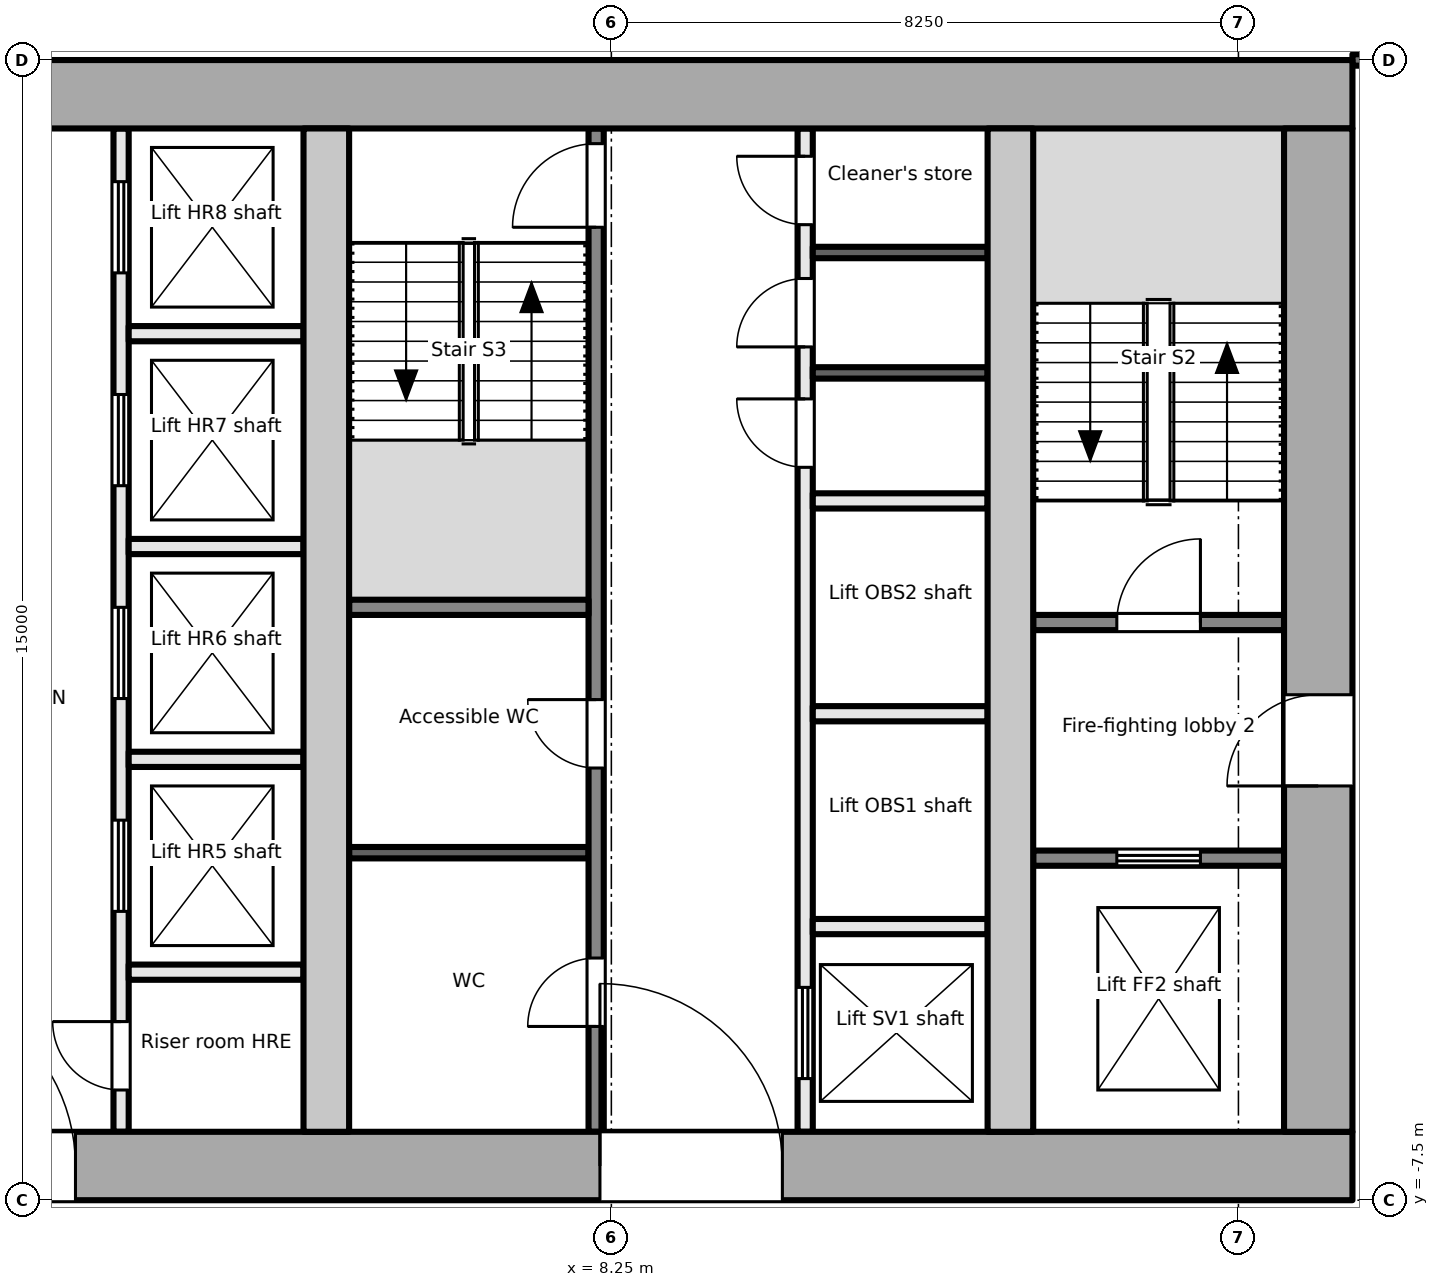
"""IFC4 building model, lengths in metres.
Left out: names, types, materials, properties, quantities, classifications, styles, units other than length and angle.
Written with IfcOpenShell. Run it as: python <this file> out.ifc"""

import sys

from ifc_helpers import new_model, si_unit, direction, frame, frame_2d, origin, place, context, subcontext, project, spatial, rectangle, extrude, element, fill, save


model = new_model("IFC4")
c1 = context("Model", 3, precision=1e-05, world=origin(), true_north=direction((0.0, 1.0)))
c2 = subcontext(c1, "Body", "Model", "MODEL_VIEW")
j1 = project(units=[si_unit("LENGTHUNIT", "METRE"), si_unit("PLANEANGLEUNIT", "RADIAN")], contexts=[c1])
p1 = place(None, origin())
s1 = spatial("IfcSite", under=j1, at=p1, CompositionType="ELEMENT")
p2 = place(p1, origin())
s2 = spatial("IfcBuilding", under=s1, at=p2, CompositionType="ELEMENT")
p3 = place(p2, frame((0.0, 0.0, 180.2)))
s3 = spatial("IfcBuildingStorey", under=s2, at=p3, CompositionType="ELEMENT", Elevation=180.2)
p4 = place(p3, frame((-18.0, -7.05, -0.2), z_axis=(0.0, 0.0, 1.0), x_axis=(1.0, 0.0, 0.0)))
e1 = element("IfcWall", 1, at=p4, inside=s3, PredefinedType="SHEAR", context=c2, shape_type="SweptSolid", body=[
    extrude(rectangle(XDim=36.0, YDim=0.9, at=frame_2d((18.0, 0.0))), origin(), (0.0, 0.0, 1.0), 3.9),
])
p5 = place(p4, frame((11.3, 0.0, 0.2)))
e2 = element("IfcOpeningElement", 2, at=p5, cuts=e1, PredefinedType="OPENING", context=c2, shape_type="SweptSolid", body=[
    extrude(rectangle(XDim=1.8, YDim=2.1, at=frame_2d((0.9, 1.05))), frame((0.0, 0.46, 0.0), z_axis=(0.0, -1.0, 0.0), x_axis=(1.0, 0.0, 0.0)), (0.0, 0.0, 1.0), 0.921),
])
p6 = place(p4, frame((16.8, 0.0, 0.2)))
e3 = element("IfcOpeningElement", 3, at=p6, cuts=e1, PredefinedType="OPENING", context=c2, shape_type="SweptSolid", body=[
    extrude(rectangle(XDim=2.4, YDim=2.1, at=frame_2d((1.2, 1.05))), frame((0.0, 0.46, 0.0), z_axis=(0.0, -1.0, 0.0), x_axis=(1.0, 0.0, 0.0)), (0.0, 0.0, 1.0), 0.921),
])
p7 = place(p4, frame((26.1, 0.0, 0.2)))
e4 = element("IfcOpeningElement", 4, at=p7, cuts=e1, PredefinedType="OPENING", context=c2, shape_type="SweptSolid", body=[
    extrude(rectangle(XDim=2.4, YDim=2.1, at=frame_2d((1.2, 1.05))), frame((0.0, 0.46, 0.0), z_axis=(0.0, -1.0, 0.0), x_axis=(1.0, 0.0, 0.0)), (0.0, 0.0, 1.0), 0.921),
])
p8 = place(p3, frame((-18.0, 7.05, -0.2), z_axis=(0.0, 0.0, 1.0), x_axis=(1.0, 0.0, 0.0)))
e5 = element("IfcWall", 5, at=p8, inside=s3, PredefinedType="SHEAR", context=c2, shape_type="SweptSolid", body=[
    extrude(rectangle(XDim=36.0, YDim=0.9, at=frame_2d((18.0, 0.0))), origin(), (0.0, 0.0, 1.0), 3.9),
])
p9 = place(p3, frame((17.55, -6.6, -0.2), z_axis=(0.0, 0.0, 1.0), x_axis=(0.0, 1.0, 0.0)))
e6 = element("IfcWall", 6, at=p9, inside=s3, PredefinedType="SHEAR", context=c2, shape_type="SweptSolid", body=[
    extrude(rectangle(XDim=13.2, YDim=0.9, at=frame_2d((6.6, 0.0))), origin(), (0.0, 0.0, 1.0), 3.9),
])
p10 = place(p9, frame((4.55, 0.0, 0.2)))
e7 = element("IfcOpeningElement", 7, at=p10, cuts=e6, PredefinedType="OPENING", context=c2, shape_type="SweptSolid", body=[
    extrude(rectangle(XDim=1.2, YDim=2.1, at=frame_2d((0.6, 1.05))), frame((0.0, 0.46, 0.0), z_axis=(0.0, -1.0, 0.0), x_axis=(1.0, 0.0, 0.0)), (0.0, 0.0, 1.0), 0.921),
])
for number, where, z_axis, x_axis in (
    (8, (4.5, -6.6, -0.2), (0.0, 0.0, 1.0), (0.0, 1.0, 0.0)),
    (9, (13.5, -6.6, -0.2), (0.0, 0.0, 1.0), (0.0, 1.0, 0.0)),
):
    element("IfcWall", number, at=place(p3, frame(where, z_axis=z_axis, x_axis=x_axis)), inside=s3, PredefinedType="SHEAR", context=c2, shape_type="SweptSolid", body=[
        extrude(rectangle(XDim=13.2, YDim=0.6, at=frame_2d((6.6, 0.0))), origin(), (0.0, 0.0, 1.0), 3.9),
    ])
p11 = place(p3, frame((13.8, -3.0, 0.0), z_axis=(0.0, 0.0, 1.0), x_axis=(1.0, 0.0, 0.0)))
e10 = element("IfcWall", 10, at=p11, inside=s3, PredefinedType="PARTITIONING", context=c2, shape_type="SweptSolid", body=[
    extrude(rectangle(XDim=3.3, YDim=0.2, at=frame_2d((1.65, 0.0))), origin(), (0.0, 0.0, 1.0), 3.7),
])
p12 = place(p11, frame((1.1, 0.0, 0.0)))
e11 = element("IfcOpeningElement", 11, at=p12, cuts=e10, PredefinedType="OPENING", context=c2, shape_type="SweptSolid", body=[
    extrude(rectangle(XDim=1.1, YDim=2.1, at=frame_2d((0.55, 1.05))), frame((0.0, 0.111, 0.0), z_axis=(0.0, -1.0, 0.0), x_axis=(1.0, 0.0, 0.0)), (0.0, 0.0, 1.0), 0.221),
])
p13 = place(p3, frame((13.8, 0.1, 0.0), z_axis=(0.0, 0.0, 1.0), x_axis=(1.0, 0.0, 0.0)))
e12 = element("IfcWall", 12, at=p13, inside=s3, PredefinedType="PARTITIONING", context=c2, shape_type="SweptSolid", body=[
    extrude(rectangle(XDim=3.3, YDim=0.2, at=frame_2d((1.65, 0.0))), origin(), (0.0, 0.0, 1.0), 3.7),
])
p14 = place(p13, frame((1.1, 0.0, 0.0)))
e13 = element("IfcOpeningElement", 13, at=p14, cuts=e12, PredefinedType="OPENING", context=c2, shape_type="SweptSolid", body=[
    extrude(rectangle(XDim=1.1, YDim=2.1, at=frame_2d((0.55, 1.05))), frame((0.0, 0.111, 0.0), z_axis=(0.0, -1.0, 0.0), x_axis=(1.0, 0.0, 0.0)), (0.0, 0.0, 1.0), 0.221),
])
p15 = place(p3, frame((1.8, -6.6, 0.0), z_axis=(0.0, 0.0, 1.0), x_axis=(0.0, 1.0, 0.0)))
e14 = element("IfcWall", 14, at=p15, inside=s3, PredefinedType="PARTITIONING", context=c2, shape_type="SweptSolid", body=[
    extrude(rectangle(XDim=13.2, YDim=0.2, at=frame_2d((6.6, 0.0))), origin(), (0.0, 0.0, 1.0), 3.7),
])
p16 = place(p15, frame((0.55, 0.0, 0.0)))
e15 = element("IfcOpeningElement", 15, at=p16, cuts=e14, PredefinedType="OPENING", context=c2, shape_type="SweptSolid", body=[
    extrude(rectangle(XDim=0.9, YDim=2.1, at=frame_2d((0.45, 1.05))), frame((0.0, 0.111, 0.0), z_axis=(0.0, -1.0, 0.0), x_axis=(1.0, 0.0, 0.0)), (0.0, 0.0, 1.0), 0.221),
])
p17 = place(p15, frame((2.9, 0.0, 0.0)))
e16 = element("IfcOpeningElement", 16, at=p17, cuts=e14, PredefinedType="OPENING", context=c2, shape_type="SweptSolid", body=[
    extrude(rectangle(XDim=1.2, YDim=2.1, at=frame_2d((0.6, 1.05))), frame((0.0, 0.111, 0.0), z_axis=(0.0, -1.0, 0.0), x_axis=(1.0, 0.0, 0.0)), (0.0, 0.0, 1.0), 0.221),
])
p18 = place(p15, frame((5.7, 0.0, 0.0)))
e17 = element("IfcOpeningElement", 17, at=p18, cuts=e14, PredefinedType="OPENING", context=c2, shape_type="SweptSolid", body=[
    extrude(rectangle(XDim=1.2, YDim=2.1, at=frame_2d((0.6, 1.05))), frame((0.0, 0.111, 0.0), z_axis=(0.0, -1.0, 0.0), x_axis=(1.0, 0.0, 0.0)), (0.0, 0.0, 1.0), 0.221),
])
p19 = place(p15, frame((8.5, 0.0, 0.0)))
e18 = element("IfcOpeningElement", 18, at=p19, cuts=e14, PredefinedType="OPENING", context=c2, shape_type="SweptSolid", body=[
    extrude(rectangle(XDim=1.2, YDim=2.1, at=frame_2d((0.6, 1.05))), frame((0.0, 0.111, 0.0), z_axis=(0.0, -1.0, 0.0), x_axis=(1.0, 0.0, 0.0)), (0.0, 0.0, 1.0), 0.221),
])
p20 = place(p15, frame((11.3, 0.0, 0.0)))
e19 = element("IfcOpeningElement", 19, at=p20, cuts=e14, PredefinedType="OPENING", context=c2, shape_type="SweptSolid", body=[
    extrude(rectangle(XDim=1.2, YDim=2.1, at=frame_2d((0.6, 1.05))), frame((0.0, 0.111, 0.0), z_axis=(0.0, -1.0, 0.0), x_axis=(1.0, 0.0, 0.0)), (0.0, 0.0, 1.0), 0.221),
])
for number, where, z_axis, x_axis in (
    (20, (1.9, -1.7, 0.0), (0.0, 0.0, 1.0), (1.0, 0.0, 0.0)),
    (21, (1.9, 1.1, 0.0), (0.0, 0.0, 1.0), (1.0, 0.0, 0.0)),
    (22, (1.9, 3.9, 0.0), (0.0, 0.0, 1.0), (1.0, 0.0, 0.0)),
    (23, (1.9, -4.5, 0.0), (0.0, 0.0, 1.0), (1.0, 0.0, 0.0)),
):
    element("IfcWall", number, at=place(p3, frame(where, z_axis=z_axis, x_axis=x_axis)), inside=s3, PredefinedType="PARTITIONING", context=c2, shape_type="SweptSolid", body=[
        extrude(rectangle(XDim=2.3, YDim=0.2, at=frame_2d((1.15, 0.0))), origin(), (0.0, 0.0, 1.0), 3.7),
    ])
p21 = place(p3, frame((8.05, -6.6, 0.0), z_axis=(0.0, 0.0, 1.0), x_axis=(0.0, 1.0, 0.0)))
e24 = element("IfcWall", 24, at=p21, inside=s3, PredefinedType="PARTITIONING", context=c2, shape_type="SweptSolid", body=[
    extrude(rectangle(XDim=13.2, YDim=0.2, at=frame_2d((6.6, 0.0))), origin(), (0.0, 0.0, 1.0), 3.7),
])
p22 = place(p21, frame((1.386, 0.0, 0.0)))
e25 = element("IfcOpeningElement", 25, at=p22, cuts=e24, PredefinedType="OPENING", context=c2, shape_type="SweptSolid", body=[
    extrude(rectangle(XDim=0.9, YDim=2.1, at=frame_2d((0.45, 1.05))), frame((0.0, 0.111, 0.0), z_axis=(0.0, -1.0, 0.0), x_axis=(1.0, 0.0, 0.0)), (0.0, 0.0, 1.0), 0.221),
])
p23 = place(p21, frame((4.786, 0.0, 0.0)))
e26 = element("IfcOpeningElement", 26, at=p23, cuts=e24, PredefinedType="OPENING", context=c2, shape_type="SweptSolid", body=[
    extrude(rectangle(XDim=0.9, YDim=2.1, at=frame_2d((0.45, 1.05))), frame((0.0, 0.111, 0.0), z_axis=(0.0, -1.0, 0.0), x_axis=(1.0, 0.0, 0.0)), (0.0, 0.0, 1.0), 0.221),
])
p24 = place(p21, frame((11.9, 0.0, 0.0)))
e27 = element("IfcOpeningElement", 27, at=p24, cuts=e24, PredefinedType="OPENING", context=c2, shape_type="SweptSolid", body=[
    extrude(rectangle(XDim=1.1, YDim=2.1, at=frame_2d((0.55, 1.05))), frame((0.0, 0.111, 0.0), z_axis=(0.0, -1.0, 0.0), x_axis=(1.0, 0.0, 0.0)), (0.0, 0.0, 1.0), 0.221),
])
p25 = place(p3, frame((10.8, -6.6, 0.0), z_axis=(0.0, 0.0, 1.0), x_axis=(0.0, 1.0, 0.0)))
e28 = element("IfcWall", 28, at=p25, inside=s3, PredefinedType="PARTITIONING", context=c2, shape_type="SweptSolid", body=[
    extrude(rectangle(XDim=13.2, YDim=0.2, at=frame_2d((6.6, 0.0))), origin(), (0.0, 0.0, 1.0), 3.7),
])
p26 = place(p25, frame((0.7, 0.0, 0.0)))
e29 = element("IfcOpeningElement", 29, at=p26, cuts=e28, PredefinedType="OPENING", context=c2, shape_type="SweptSolid", body=[
    extrude(rectangle(XDim=1.2, YDim=2.1, at=frame_2d((0.6, 1.05))), frame((0.0, 0.111, 0.0), z_axis=(0.0, -1.0, 0.0), x_axis=(1.0, 0.0, 0.0)), (0.0, 0.0, 1.0), 0.221),
])
p27 = place(p25, frame((8.742, 0.0, 0.0)))
e30 = element("IfcOpeningElement", 30, at=p27, cuts=e28, PredefinedType="OPENING", context=c2, shape_type="SweptSolid", body=[
    extrude(rectangle(XDim=0.9, YDim=2.1, at=frame_2d((0.45, 1.05))), frame((0.0, 0.111, 0.0), z_axis=(0.0, -1.0, 0.0), x_axis=(1.0, 0.0, 0.0)), (0.0, 0.0, 1.0), 0.221),
])
p28 = place(p25, frame((10.326, 0.0, 0.0)))
e31 = element("IfcOpeningElement", 31, at=p28, cuts=e28, PredefinedType="OPENING", context=c2, shape_type="SweptSolid", body=[
    extrude(rectangle(XDim=0.9, YDim=2.1, at=frame_2d((0.45, 1.05))), frame((0.0, 0.111, 0.0), z_axis=(0.0, -1.0, 0.0), x_axis=(1.0, 0.0, 0.0)), (0.0, 0.0, 1.0), 0.221),
])
p29 = place(p25, frame((11.934, 0.0, 0.0)))
e32 = element("IfcOpeningElement", 32, at=p29, cuts=e28, PredefinedType="OPENING", context=c2, shape_type="SweptSolid", body=[
    extrude(rectangle(XDim=0.9, YDim=2.1, at=frame_2d((0.45, 1.05))), frame((0.0, 0.111, 0.0), z_axis=(0.0, -1.0, 0.0), x_axis=(1.0, 0.0, 0.0)), (0.0, 0.0, 1.0), 0.221),
])
p30 = place(p3, frame((4.8, 0.3, 0.0), z_axis=(0.0, 0.0, 1.0), x_axis=(1.0, 0.0, 0.0)))
e33 = element("IfcWall", 33, at=p30, inside=s3, PredefinedType="PARTITIONING", context=c2, shape_type="SweptSolid", body=[
    extrude(rectangle(XDim=3.15, YDim=0.2, at=frame_2d((1.575, 0.0))), origin(), (0.0, 0.0, 1.0), 3.7),
])
p31 = place(p3, frame((4.8, -2.928, 0.0), z_axis=(0.0, 0.0, 1.0), x_axis=(1.0, 0.0, 0.0)))
e34 = element("IfcWall", 34, at=p31, inside=s3, PredefinedType="PARTITIONING", context=c2, shape_type="SweptSolid", body=[
    extrude(rectangle(XDim=3.15, YDim=0.15, at=frame_2d((1.575, 0.0))), origin(), (0.0, 0.0, 1.0), 3.7),
])
for number, where, z_axis, x_axis in (
    (35, (10.9, -3.9, 0.0), (0.0, 0.0, 1.0), (1.0, 0.0, 0.0)),
    (36, (10.9, -1.1, 0.0), (0.0, 0.0, 1.0), (1.0, 0.0, 0.0)),
    (37, (10.9, 1.7, 0.0), (0.0, 0.0, 1.0), (1.0, 0.0, 0.0)),
):
    element("IfcWall", number, at=place(p3, frame(where, z_axis=z_axis, x_axis=x_axis)), inside=s3, PredefinedType="PARTITIONING", context=c2, shape_type="SweptSolid", body=[
        extrude(rectangle(XDim=2.3, YDim=0.2, at=frame_2d((1.15, 0.0))), origin(), (0.0, 0.0, 1.0), 3.7),
    ])
for number, where, z_axis, x_axis in (
    (38, (10.9, 3.384, 0.0), (0.0, 0.0, 1.0), (1.0, 0.0, 0.0)),
    (39, (10.9, 4.968, 0.0), (0.0, 0.0, 1.0), (1.0, 0.0, 0.0)),
):
    element("IfcWall", number, at=place(p3, frame(where, z_axis=z_axis, x_axis=x_axis)), inside=s3, PredefinedType="PARTITIONING", context=c2, shape_type="SweptSolid", body=[
        extrude(rectangle(XDim=2.3, YDim=0.15, at=frame_2d((1.15, 0.0))), origin(), (0.0, 0.0, 1.0), 3.7),
    ])
p32 = place(p3, frame((18.0, 7.501, 0.0), z_axis=(0.0, 0.0, 1.0), x_axis=(1.0, 0.0, 0.0)))
e40 = element("IfcWall", 40, at=p32, inside=s3, PredefinedType="PARTITIONING", context=c2, shape_type="SweptSolid", body=[
    extrude(rectangle(XDim=2.624, YDim=0.15, at=frame_2d((1.312, 0.0))), origin(), (0.0, 0.0, 1.0), 3.7),
])
p33 = place(p12, origin())
e41 = element("IfcDoor", 41, at=p33, inside=s3, OperationType="DOUBLE_DOOR_SLIDING", PredefinedType="DOOR", context=c2, shape_type="SweptSolid", body=[
    extrude(rectangle(XDim=1.1, YDim=2.1, at=frame_2d((0.55, 1.05))), frame((0.0, 0.025, 0.0), z_axis=(0.0, -1.0, 0.0), x_axis=(1.0, 0.0, 0.0)), (0.0, 0.0, 1.0), 0.05),
])
fill(e11, e41)
p34 = place(p10, origin())
e42 = element("IfcDoor", 42, at=p34, inside=s3, OperationType="SINGLE_SWING_LEFT", PredefinedType="DOOR", context=c2, shape_type="SweptSolid", body=[
    extrude(rectangle(XDim=1.2, YDim=2.1, at=frame_2d((0.6, 1.05))), frame((0.0, 0.025, 0.0), z_axis=(0.0, -1.0, 0.0), x_axis=(1.0, 0.0, 0.0)), (0.0, 0.0, 1.0), 0.05),
])
fill(e7, e42)
p35 = place(p14, origin())
e43 = element("IfcDoor", 43, at=p35, inside=s3, OperationType="SINGLE_SWING_RIGHT", PredefinedType="DOOR", context=c2, shape_type="SweptSolid", body=[
    extrude(rectangle(XDim=1.1, YDim=2.1, at=frame_2d((0.55, 1.05))), frame((0.0, 0.025, 0.0), z_axis=(0.0, -1.0, 0.0), x_axis=(1.0, 0.0, 0.0)), (0.0, 0.0, 1.0), 0.05),
])
fill(e13, e43)
p36 = place(p16, origin())
e44 = element("IfcDoor", 44, at=p36, inside=s3, OperationType="SINGLE_SWING_RIGHT", PredefinedType="DOOR", context=c2, shape_type="SweptSolid", body=[
    extrude(rectangle(XDim=0.9, YDim=2.1, at=frame_2d((0.45, 1.05))), frame((0.0, 0.025, 0.0), z_axis=(0.0, -1.0, 0.0), x_axis=(1.0, 0.0, 0.0)), (0.0, 0.0, 1.0), 0.05),
])
fill(e15, e44)
p37 = place(p17, origin())
e45 = element("IfcDoor", 45, at=p37, inside=s3, OperationType="DOUBLE_DOOR_SLIDING", PredefinedType="DOOR", context=c2, shape_type="SweptSolid", body=[
    extrude(rectangle(XDim=1.2, YDim=2.1, at=frame_2d((0.6, 1.05))), frame((0.0, 0.025, 0.0), z_axis=(0.0, -1.0, 0.0), x_axis=(1.0, 0.0, 0.0)), (0.0, 0.0, 1.0), 0.05),
])
fill(e16, e45)
p38 = place(p18, origin())
e46 = element("IfcDoor", 46, at=p38, inside=s3, OperationType="DOUBLE_DOOR_SLIDING", PredefinedType="DOOR", context=c2, shape_type="SweptSolid", body=[
    extrude(rectangle(XDim=1.2, YDim=2.1, at=frame_2d((0.6, 1.05))), frame((0.0, 0.025, 0.0), z_axis=(0.0, -1.0, 0.0), x_axis=(1.0, 0.0, 0.0)), (0.0, 0.0, 1.0), 0.05),
])
fill(e17, e46)
p39 = place(p19, origin())
e47 = element("IfcDoor", 47, at=p39, inside=s3, OperationType="DOUBLE_DOOR_SLIDING", PredefinedType="DOOR", context=c2, shape_type="SweptSolid", body=[
    extrude(rectangle(XDim=1.2, YDim=2.1, at=frame_2d((0.6, 1.05))), frame((0.0, 0.025, 0.0), z_axis=(0.0, -1.0, 0.0), x_axis=(1.0, 0.0, 0.0)), (0.0, 0.0, 1.0), 0.05),
])
fill(e18, e47)
p40 = place(p20, origin())
e48 = element("IfcDoor", 48, at=p40, inside=s3, OperationType="DOUBLE_DOOR_SLIDING", PredefinedType="DOOR", context=c2, shape_type="SweptSolid", body=[
    extrude(rectangle(XDim=1.2, YDim=2.1, at=frame_2d((0.6, 1.05))), frame((0.0, 0.025, 0.0), z_axis=(0.0, -1.0, 0.0), x_axis=(1.0, 0.0, 0.0)), (0.0, 0.0, 1.0), 0.05),
])
fill(e19, e48)
p41 = place(p6, origin())
e49 = element("IfcDoor", 49, at=p41, inside=s3, OperationType="DOUBLE_DOOR_DOUBLE_SWING", PredefinedType="DOOR", context=c2, shape_type="SweptSolid", body=[
    extrude(rectangle(XDim=2.4, YDim=2.1, at=frame_2d((1.2, 1.05))), frame((0.0, 0.025, 0.0), z_axis=(0.0, -1.0, 0.0), x_axis=(1.0, 0.0, 0.0)), (0.0, 0.0, 1.0), 0.05),
])
fill(e3, e49)
p42 = place(p22, origin())
e50 = element("IfcDoor", 50, at=p42, inside=s3, OperationType="SINGLE_SWING_LEFT", PredefinedType="DOOR", context=c2, shape_type="SweptSolid", body=[
    extrude(rectangle(XDim=0.9, YDim=2.1, at=frame_2d((0.45, 1.05))), frame((0.0, 0.025, 0.0), z_axis=(0.0, -1.0, 0.0), x_axis=(1.0, 0.0, 0.0)), (0.0, 0.0, 1.0), 0.05),
])
fill(e25, e50)
p43 = place(p23, origin())
e51 = element("IfcDoor", 51, at=p43, inside=s3, OperationType="SINGLE_SWING_RIGHT", PredefinedType="DOOR", context=c2, shape_type="SweptSolid", body=[
    extrude(rectangle(XDim=0.9, YDim=2.1, at=frame_2d((0.45, 1.05))), frame((0.0, 0.025, 0.0), z_axis=(0.0, -1.0, 0.0), x_axis=(1.0, 0.0, 0.0)), (0.0, 0.0, 1.0), 0.05),
])
fill(e26, e51)
p44 = place(p24, origin())
e52 = element("IfcDoor", 52, at=p44, inside=s3, OperationType="SINGLE_SWING_LEFT", PredefinedType="DOOR", context=c2, shape_type="SweptSolid", body=[
    extrude(rectangle(XDim=1.1, YDim=2.1, at=frame_2d((0.55, 1.05))), frame((0.0, 0.025, 0.0), z_axis=(0.0, -1.0, 0.0), x_axis=(1.0, 0.0, 0.0)), (0.0, 0.0, 1.0), 0.05),
])
fill(e27, e52)
p45 = place(p7, origin())
e53 = element("IfcDoor", 53, at=p45, inside=s3, OperationType="DOUBLE_DOOR_DOUBLE_SWING", PredefinedType="DOOR", context=c2, shape_type="SweptSolid", body=[
    extrude(rectangle(XDim=2.4, YDim=2.1, at=frame_2d((1.2, 1.05))), frame((0.0, 0.025, 0.0), z_axis=(0.0, -1.0, 0.0), x_axis=(1.0, 0.0, 0.0)), (0.0, 0.0, 1.0), 0.05),
])
fill(e4, e53)
p46 = place(p26, origin())
e54 = element("IfcDoor", 54, at=p46, inside=s3, OperationType="DOUBLE_DOOR_SLIDING", PredefinedType="DOOR", context=c2, shape_type="SweptSolid", body=[
    extrude(rectangle(XDim=1.2, YDim=2.1, at=frame_2d((0.6, 1.05))), frame((0.0, 0.025, 0.0), z_axis=(0.0, -1.0, 0.0), x_axis=(1.0, 0.0, 0.0)), (0.0, 0.0, 1.0), 0.05),
])
fill(e29, e54)
p47 = place(p27, origin())
e55 = element("IfcDoor", 55, at=p47, inside=s3, OperationType="SINGLE_SWING_RIGHT", PredefinedType="DOOR", context=c2, shape_type="SweptSolid", body=[
    extrude(rectangle(XDim=0.9, YDim=2.1, at=frame_2d((0.45, 1.05))), frame((0.0, 0.025, 0.0), z_axis=(0.0, -1.0, 0.0), x_axis=(1.0, 0.0, 0.0)), (0.0, 0.0, 1.0), 0.05),
])
fill(e30, e55)
p48 = place(p28, origin())
e56 = element("IfcDoor", 56, at=p48, inside=s3, OperationType="SINGLE_SWING_LEFT", PredefinedType="DOOR", context=c2, shape_type="SweptSolid", body=[
    extrude(rectangle(XDim=0.9, YDim=2.1, at=frame_2d((0.45, 1.05))), frame((0.0, 0.025, 0.0), z_axis=(0.0, -1.0, 0.0), x_axis=(1.0, 0.0, 0.0)), (0.0, 0.0, 1.0), 0.05),
])
fill(e31, e56)
p49 = place(p29, origin())
e57 = element("IfcDoor", 57, at=p49, inside=s3, OperationType="SINGLE_SWING_RIGHT", PredefinedType="DOOR", context=c2, shape_type="SweptSolid", body=[
    extrude(rectangle(XDim=0.9, YDim=2.1, at=frame_2d((0.45, 1.05))), frame((0.0, 0.025, 0.0), z_axis=(0.0, -1.0, 0.0), x_axis=(1.0, 0.0, 0.0)), (0.0, 0.0, 1.0), 0.05),
])
fill(e32, e57)
save(model, sys.argv[1])
